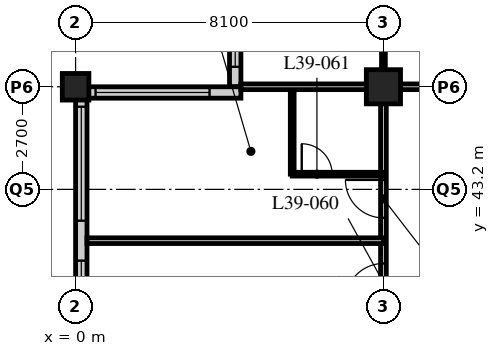
"""IFC4 building model, lengths in metres.
Left out: names, types, materials, properties, quantities, classifications, styles, units other than length and angle.
Written with IfcOpenShell. Run it as: python <this file> out.ifc"""

import sys

from ifc_helpers import new_model, si_unit, direction, frame, frame_2d, origin, origin_2d, place, context, subcontext, project, spatial, rectangle, hollow_rectangle, extrude, element, fill, save


model = new_model("IFC4")
c1 = context("Model", 3, precision=1e-05, world=origin(), true_north=direction((0.0, 1.0)))
c2 = subcontext(c1, "Body", "Model", "MODEL_VIEW")
j1 = project(units=[si_unit("LENGTHUNIT", "METRE"), si_unit("PLANEANGLEUNIT", "RADIAN")], contexts=[c1])
p1 = place(None, origin())
s1 = spatial("IfcSite", under=j1, at=p1, CompositionType="ELEMENT")
p2 = place(p1, origin())
s2 = spatial("IfcBuilding", under=s1, at=p2, CompositionType="ELEMENT")
p3 = place(p2, frame((0.0, 0.0, 151.0)))
s3 = spatial("IfcBuildingStorey", under=s2, at=p3, CompositionType="ELEMENT", Elevation=151.0)
p4 = place(p3, frame((0.0, 45.9, 0.0), z_axis=(0.0, 0.0, 1.0), x_axis=(1.0, 0.0, 0.0)))
e1 = element("IfcColumn", 1, at=p4, inside=s3, PredefinedType="COLUMN", context=c2, shape_type="SweptSolid", body=[
    extrude(hollow_rectangle(XDim=0.7, YDim=0.7, WallThickness=0.07, at=origin_2d()), origin(), (0.0, 0.0, 1.0), 3.4),
])
p5 = place(p3, frame((8.1, 45.9, 0.0), z_axis=(0.0, 0.0, 1.0), x_axis=(1.0, 0.0, 0.0)))
e2 = element("IfcColumn", 2, at=p5, inside=s3, PredefinedType="COLUMN", context=c2, shape_type="SweptSolid", body=[
    extrude(hollow_rectangle(XDim=0.9, YDim=0.9, WallThickness=0.1, at=origin_2d()), origin(), (0.0, 0.0, 1.0), 3.4),
])
p6 = place(p3, frame((4.2, 49.65, 0.0), z_axis=(0.0, 0.0, 1.0), x_axis=(0.0, -1.0, 0.0)))
e3 = element("IfcWall", 3, at=p6, inside=s3, PredefinedType="SOLIDWALL", context=c2, shape_type="SweptSolid", body=[
    extrude(rectangle(XDim=3.75, YDim=0.3, at=frame_2d((1.875, 0.0))), origin(), (0.0, 0.0, 1.0), 3.19),
])
p7 = place(p6, frame((0.225, 0.0, 0.9)))
e4 = element("IfcOpeningElement", 4, at=p7, cuts=e3, PredefinedType="OPENING", context=c2, shape_type="SweptSolid", body=[
    extrude(rectangle(XDim=3.0, YDim=1.4, at=frame_2d((1.5, 0.7))), frame((0.0, 0.16, 0.0), z_axis=(0.0, -1.0, 0.0), x_axis=(1.0, 0.0, 0.0)), (0.0, 0.0, 1.0), 0.32),
])
p8 = place(p3, frame((4.35, 45.75, 0.0), z_axis=(0.0, 0.0, 1.0), x_axis=(-1.0, 0.0, 0.0)))
e5 = element("IfcWall", 5, at=p8, inside=s3, PredefinedType="SOLIDWALL", context=c2, shape_type="SweptSolid", body=[
    extrude(rectangle(XDim=4.35, YDim=0.3, at=frame_2d((2.175, 0.0))), origin(), (0.0, 0.0, 1.0), 3.19),
])
p9 = place(p8, frame((0.825, 0.0, 0.9)))
e6 = element("IfcOpeningElement", 6, at=p9, cuts=e5, PredefinedType="OPENING", context=c2, shape_type="SweptSolid", body=[
    extrude(rectangle(XDim=3.0, YDim=1.4, at=frame_2d((1.5, 0.7))), frame((0.0, 0.16, 0.0), z_axis=(0.0, -1.0, 0.0), x_axis=(1.0, 0.0, 0.0)), (0.0, 0.0, 1.0), 0.32),
])
p10 = place(p3, frame((0.15, 45.6, 0.0), z_axis=(0.0, 0.0, 1.0), x_axis=(0.0, -1.0, 0.0)))
e7 = element("IfcWall", 7, at=p10, inside=s3, PredefinedType="SOLIDWALL", context=c2, shape_type="SweptSolid", body=[
    extrude(rectangle(XDim=32.1, YDim=0.3, at=frame_2d((16.05, 0.0))), origin(), (0.0, 0.0, 1.0), 3.19),
])
p11 = place(p10, frame((0.225, 0.0, 0.9)))
e8 = element("IfcOpeningElement", 8, at=p11, cuts=e7, PredefinedType="OPENING", context=c2, shape_type="SweptSolid", body=[
    extrude(rectangle(XDim=3.0, YDim=1.4, at=frame_2d((1.5, 0.7))), frame((0.0, 0.16, 0.0), z_axis=(0.0, -1.0, 0.0), x_axis=(1.0, 0.0, 0.0)), (0.0, 0.0, 1.0), 0.32),
])
p12 = place(p10, frame((4.275, 0.0, 0.9)))
e9 = element("IfcOpeningElement", 9, at=p12, cuts=e7, PredefinedType="OPENING", context=c2, shape_type="SweptSolid", body=[
    extrude(rectangle(XDim=3.0, YDim=1.4, at=frame_2d((1.5, 0.7))), frame((0.0, 0.16, 0.0), z_axis=(0.0, -1.0, 0.0), x_axis=(1.0, 0.0, 0.0)), (0.0, 0.0, 1.0), 0.32),
])
p13 = place(p10, frame((8.325, 0.0, 0.9)))
e10 = element("IfcOpeningElement", 10, at=p13, cuts=e7, PredefinedType="OPENING", context=c2, shape_type="SweptSolid", body=[
    extrude(rectangle(XDim=3.0, YDim=1.4, at=frame_2d((1.5, 0.7))), frame((0.0, 0.16, 0.0), z_axis=(0.0, -1.0, 0.0), x_axis=(1.0, 0.0, 0.0)), (0.0, 0.0, 1.0), 0.32),
])
p14 = place(p10, frame((12.375, 0.0, 0.9)))
e11 = element("IfcOpeningElement", 11, at=p14, cuts=e7, PredefinedType="OPENING", context=c2, shape_type="SweptSolid", body=[
    extrude(rectangle(XDim=3.0, YDim=1.4, at=frame_2d((1.5, 0.7))), frame((0.0, 0.16, 0.0), z_axis=(0.0, -1.0, 0.0), x_axis=(1.0, 0.0, 0.0)), (0.0, 0.0, 1.0), 0.32),
])
p15 = place(p10, frame((16.425, 0.0, 0.9)))
e12 = element("IfcOpeningElement", 12, at=p15, cuts=e7, PredefinedType="OPENING", context=c2, shape_type="SweptSolid", body=[
    extrude(rectangle(XDim=3.0, YDim=1.4, at=frame_2d((1.5, 0.7))), frame((0.0, 0.16, 0.0), z_axis=(0.0, -1.0, 0.0), x_axis=(1.0, 0.0, 0.0)), (0.0, 0.0, 1.0), 0.32),
])
p16 = place(p10, frame((20.475, 0.0, 0.9)))
e13 = element("IfcOpeningElement", 13, at=p16, cuts=e7, PredefinedType="OPENING", context=c2, shape_type="SweptSolid", body=[
    extrude(rectangle(XDim=3.0, YDim=1.4, at=frame_2d((1.5, 0.7))), frame((0.0, 0.16, 0.0), z_axis=(0.0, -1.0, 0.0), x_axis=(1.0, 0.0, 0.0)), (0.0, 0.0, 1.0), 0.32),
])
p17 = place(p10, frame((24.525, 0.0, 0.9)))
e14 = element("IfcOpeningElement", 14, at=p17, cuts=e7, PredefinedType="OPENING", context=c2, shape_type="SweptSolid", body=[
    extrude(rectangle(XDim=3.0, YDim=1.4, at=frame_2d((1.5, 0.7))), frame((0.0, 0.16, 0.0), z_axis=(0.0, -1.0, 0.0), x_axis=(1.0, 0.0, 0.0)), (0.0, 0.0, 1.0), 0.32),
])
p18 = place(p10, frame((28.575, 0.0, 0.9)))
e15 = element("IfcOpeningElement", 15, at=p18, cuts=e7, PredefinedType="OPENING", context=c2, shape_type="SweptSolid", body=[
    extrude(rectangle(XDim=3.0, YDim=1.4, at=frame_2d((1.5, 0.7))), frame((0.0, 0.16, 0.0), z_axis=(0.0, -1.0, 0.0), x_axis=(1.0, 0.0, 0.0)), (0.0, 0.0, 1.0), 0.32),
])
p19 = place(p3, frame((8.1, 45.9, 0.0), z_axis=(0.0, 0.0, 1.0), x_axis=(1.0, 0.0, 0.0)))
e16 = element("IfcWall", 16, at=p19, inside=s3, PredefinedType="PARTITIONING", context=c2, shape_type="SweptSolid", body=[
    extrude(rectangle(XDim=40.5, YDim=0.15, at=frame_2d((20.25, 0.0))), origin(), (0.0, 0.0, 1.0), 2.42),
])
p20 = place(p19, frame((9.625, 0.0, 0.0)))
e17 = element("IfcOpeningElement", 17, at=p20, cuts=e16, PredefinedType="OPENING", context=c2, shape_type="SweptSolid", body=[
    extrude(rectangle(XDim=1.0, YDim=2.1, at=frame_2d((0.5, 1.05))), frame((0.0, 0.085, 0.0), z_axis=(0.0, -1.0, 0.0), x_axis=(1.0, 0.0, 0.0)), (0.0, 0.0, 1.0), 0.17),
])
p21 = place(p19, frame((21.775, 0.0, 0.0)))
e18 = element("IfcOpeningElement", 18, at=p21, cuts=e16, PredefinedType="OPENING", context=c2, shape_type="SweptSolid", body=[
    extrude(rectangle(XDim=1.0, YDim=2.1, at=frame_2d((0.5, 1.05))), frame((0.0, 0.085, 0.0), z_axis=(0.0, -1.0, 0.0), x_axis=(1.0, 0.0, 0.0)), (0.0, 0.0, 1.0), 0.17),
])
p22 = place(p19, frame((28.95, 0.0, 0.0)))
e19 = element("IfcOpeningElement", 19, at=p22, cuts=e16, PredefinedType="OPENING", context=c2, shape_type="SweptSolid", body=[
    extrude(rectangle(XDim=1.0, YDim=2.1, at=frame_2d((0.5, 1.05))), frame((0.0, 0.085, 0.0), z_axis=(0.0, -1.0, 0.0), x_axis=(1.0, 0.0, 0.0)), (0.0, 0.0, 1.0), 0.17),
])
p23 = place(p19, frame((34.85, 0.0, 0.0)))
e20 = element("IfcOpeningElement", 20, at=p23, cuts=e16, PredefinedType="OPENING", context=c2, shape_type="SweptSolid", body=[
    extrude(rectangle(XDim=1.0, YDim=2.1, at=frame_2d((0.5, 1.05))), frame((0.0, 0.085, 0.0), z_axis=(0.0, -1.0, 0.0), x_axis=(1.0, 0.0, 0.0)), (0.0, 0.0, 1.0), 0.17),
])
p24 = place(p19, frame((36.875, 0.0, 0.0)))
e21 = element("IfcOpeningElement", 21, at=p24, cuts=e16, PredefinedType="OPENING", context=c2, shape_type="SweptSolid", body=[
    extrude(rectangle(XDim=1.0, YDim=2.1, at=frame_2d((0.5, 1.05))), frame((0.0, 0.085, 0.0), z_axis=(0.0, -1.0, 0.0), x_axis=(1.0, 0.0, 0.0)), (0.0, 0.0, 1.0), 0.17),
])
p25 = place(p19, frame((2.625, 0.0, 0.0)))
e22 = element("IfcOpeningElement", 22, at=p25, cuts=e16, PredefinedType="OPENING", context=c2, shape_type="SweptSolid", body=[
    extrude(rectangle(XDim=1.0, YDim=2.1, at=frame_2d((0.5, 1.05))), frame((0.0, 0.085, 0.0), z_axis=(0.0, -1.0, 0.0), x_axis=(1.0, 0.0, 0.0)), (0.0, 0.0, 1.0), 0.17),
])
p26 = place(p3, frame((8.1, 17.55, 0.0), z_axis=(0.0, 0.0, 1.0), x_axis=(0.0, 1.0, 0.0)))
e23 = element("IfcWall", 23, at=p26, inside=s3, PredefinedType="PARTITIONING", context=c2, shape_type="SweptSolid", body=[
    extrude(rectangle(XDim=28.35, YDim=0.15, at=frame_2d((14.175, 0.0))), origin(), (0.0, 0.0, 1.0), 2.42),
])
p27 = place(p26, frame((5.95, 0.0, 0.0)))
e24 = element("IfcOpeningElement", 24, at=p27, cuts=e23, PredefinedType="OPENING", context=c2, shape_type="SweptSolid", body=[
    extrude(rectangle(XDim=1.0, YDim=2.1, at=frame_2d((0.5, 1.05))), frame((0.0, 0.085, 0.0), z_axis=(0.0, -1.0, 0.0), x_axis=(1.0, 0.0, 0.0)), (0.0, 0.0, 1.0), 0.17),
])
p28 = place(p26, frame((16.8, 0.0, 0.0)))
e25 = element("IfcOpeningElement", 25, at=p28, cuts=e23, PredefinedType="OPENING", context=c2, shape_type="SweptSolid", body=[
    extrude(rectangle(XDim=1.0, YDim=2.1, at=frame_2d((0.5, 1.05))), frame((0.0, 0.085, 0.0), z_axis=(0.0, -1.0, 0.0), x_axis=(1.0, 0.0, 0.0)), (0.0, 0.0, 1.0), 0.17),
])
p29 = place(p26, frame((22.7, 0.0, 0.0)))
e26 = element("IfcOpeningElement", 26, at=p29, cuts=e23, PredefinedType="OPENING", context=c2, shape_type="SweptSolid", body=[
    extrude(rectangle(XDim=1.0, YDim=2.1, at=frame_2d((0.5, 1.05))), frame((0.0, 0.085, 0.0), z_axis=(0.0, -1.0, 0.0), x_axis=(1.0, 0.0, 0.0)), (0.0, 0.0, 1.0), 0.17),
])
p30 = place(p26, frame((24.9, 0.0, 0.0)))
e27 = element("IfcOpeningElement", 27, at=p30, cuts=e23, PredefinedType="OPENING", context=c2, shape_type="SweptSolid", body=[
    extrude(rectangle(XDim=1.0, YDim=2.1, at=frame_2d((0.5, 1.05))), frame((0.0, 0.085, 0.0), z_axis=(0.0, -1.0, 0.0), x_axis=(1.0, 0.0, 0.0)), (0.0, 0.0, 1.0), 0.17),
])
p31 = place(p3, frame((8.1, 41.85, 0.0), z_axis=(0.0, 0.0, 1.0), x_axis=(-1.0, 0.0, 0.0)))
e28 = element("IfcWall", 28, at=p31, inside=s3, PredefinedType="PARTITIONING", context=c2, shape_type="SweptSolid", body=[
    extrude(rectangle(XDim=7.8, YDim=0.15, at=frame_2d((3.9, 0.0))), origin(), (0.0, 0.0, 1.0), 3.19),
])
p32 = place(p3, frame((5.7, 43.6, 0.0), z_axis=(0.0, 0.0, 1.0), x_axis=(0.0, 1.0, 0.0)))
e29 = element("IfcWall", 29, at=p32, inside=s3, PredefinedType="PARTITIONING", context=c2, shape_type="SweptSolid", body=[
    extrude(rectangle(XDim=2.3, YDim=0.1, at=frame_2d((1.15, 0.0))), origin(), (0.0, 0.0, 1.0), 3.19),
])
p33 = place(p3, frame((8.1, 43.6, 0.0), z_axis=(0.0, 0.0, 1.0), x_axis=(-1.0, 0.0, 0.0)))
e30 = element("IfcWall", 30, at=p33, inside=s3, PredefinedType="PARTITIONING", context=c2, shape_type="SweptSolid", body=[
    extrude(rectangle(XDim=2.4, YDim=0.1, at=frame_2d((1.2, 0.0))), origin(), (0.0, 0.0, 1.0), 3.19),
])
p34 = place(p33, frame((1.35, 0.0, 0.0)))
e31 = element("IfcOpeningElement", 31, at=p34, cuts=e30, PredefinedType="OPENING", context=c2, shape_type="SweptSolid", body=[
    extrude(rectangle(XDim=0.8, YDim=2.1, at=frame_2d((0.4, 1.05))), frame((0.0, 0.06, 0.0), z_axis=(0.0, -1.0, 0.0), x_axis=(1.0, 0.0, 0.0)), (0.0, 0.0, 1.0), 0.12),
])
p35 = place(p3, frame((8.1, 45.9, 0.0), z_axis=(0.0, 0.0, 1.0), x_axis=(0.0, 1.0, 0.0)))
e32 = element("IfcWall", 32, at=p35, inside=s3, PredefinedType="PARTITIONING", context=c2, shape_type="SweptSolid", body=[
    extrude(rectangle(XDim=2.4, YDim=0.1, at=frame_2d((1.2, 0.0))), origin(), (0.0, 0.0, 1.0), 2.42),
])
p36 = place(p3, frame((4.35, 45.9, 0.0), z_axis=(0.0, 0.0, 1.0), x_axis=(1.0, 0.0, 0.0)))
e33 = element("IfcWall", 33, at=p36, inside=s3, PredefinedType="PARTITIONING", context=c2, shape_type="SweptSolid", body=[
    extrude(rectangle(XDim=3.75, YDim=0.15, at=frame_2d((1.875, 0.0))), origin(), (0.0, 0.0, 1.0), 2.42),
])
p37 = place(p7, origin())
e34 = element("IfcWindow", 34, at=p37, inside=s3, PartitioningType="SINGLE_PANEL", PredefinedType="WINDOW", context=c2, shape_type="SweptSolid", body=[
    extrude(rectangle(XDim=3.0, YDim=1.4, at=frame_2d((1.5, 0.7))), frame((0.0, 0.03, 0.0), z_axis=(0.0, -1.0, 0.0), x_axis=(1.0, 0.0, 0.0)), (0.0, 0.0, 1.0), 0.06),
])
fill(e4, e34)
p38 = place(p9, origin())
e35 = element("IfcWindow", 35, at=p38, inside=s3, PartitioningType="SINGLE_PANEL", PredefinedType="WINDOW", context=c2, shape_type="SweptSolid", body=[
    extrude(rectangle(XDim=3.0, YDim=1.4, at=frame_2d((1.5, 0.7))), frame((0.0, 0.03, 0.0), z_axis=(0.0, -1.0, 0.0), x_axis=(1.0, 0.0, 0.0)), (0.0, 0.0, 1.0), 0.06),
])
fill(e6, e35)
p39 = place(p11, origin())
e36 = element("IfcWindow", 36, at=p39, inside=s3, PartitioningType="SINGLE_PANEL", PredefinedType="WINDOW", context=c2, shape_type="SweptSolid", body=[
    extrude(rectangle(XDim=3.0, YDim=1.4, at=frame_2d((1.5, 0.7))), frame((0.0, 0.03, 0.0), z_axis=(0.0, -1.0, 0.0), x_axis=(1.0, 0.0, 0.0)), (0.0, 0.0, 1.0), 0.06),
])
fill(e8, e36)
p40 = place(p12, origin())
e37 = element("IfcWindow", 37, at=p40, inside=s3, PartitioningType="SINGLE_PANEL", PredefinedType="WINDOW", context=c2, shape_type="SweptSolid", body=[
    extrude(rectangle(XDim=3.0, YDim=1.4, at=frame_2d((1.5, 0.7))), frame((0.0, 0.03, 0.0), z_axis=(0.0, -1.0, 0.0), x_axis=(1.0, 0.0, 0.0)), (0.0, 0.0, 1.0), 0.06),
])
fill(e9, e37)
p41 = place(p29, origin())
e38 = element("IfcDoor", 38, at=p41, inside=s3, OperationType="SINGLE_SWING_LEFT", PredefinedType="DOOR", context=c2, shape_type="SweptSolid", body=[
    extrude(rectangle(XDim=1.0, YDim=2.1, at=frame_2d((0.5, 1.05))), frame((0.0, 0.025, 0.0), z_axis=(0.0, -1.0, 0.0), x_axis=(1.0, 0.0, 0.0)), (0.0, 0.0, 1.0), 0.05),
])
fill(e26, e38)
p42 = place(p34, origin())
e39 = element("IfcDoor", 39, at=p42, inside=s3, OperationType="SINGLE_SWING_LEFT", PredefinedType="DOOR", context=c2, shape_type="SweptSolid", body=[
    extrude(rectangle(XDim=0.8, YDim=2.1, at=frame_2d((0.4, 1.05))), frame((0.0, 0.025, 0.0), z_axis=(0.0, -1.0, 0.0), x_axis=(1.0, 0.0, 0.0)), (0.0, 0.0, 1.0), 0.05),
])
fill(e31, e39)
p43 = place(p30, origin())
e40 = element("IfcDoor", 40, at=p43, inside=s3, OperationType="SINGLE_SWING_RIGHT", PredefinedType="DOOR", context=c2, shape_type="SweptSolid", body=[
    extrude(rectangle(XDim=1.0, YDim=2.1, at=frame_2d((0.5, 1.05))), frame((0.0, 0.025, 0.0), z_axis=(0.0, -1.0, 0.0), x_axis=(1.0, 0.0, 0.0)), (0.0, 0.0, 1.0), 0.05),
])
fill(e27, e40)
save(model, sys.argv[1])
